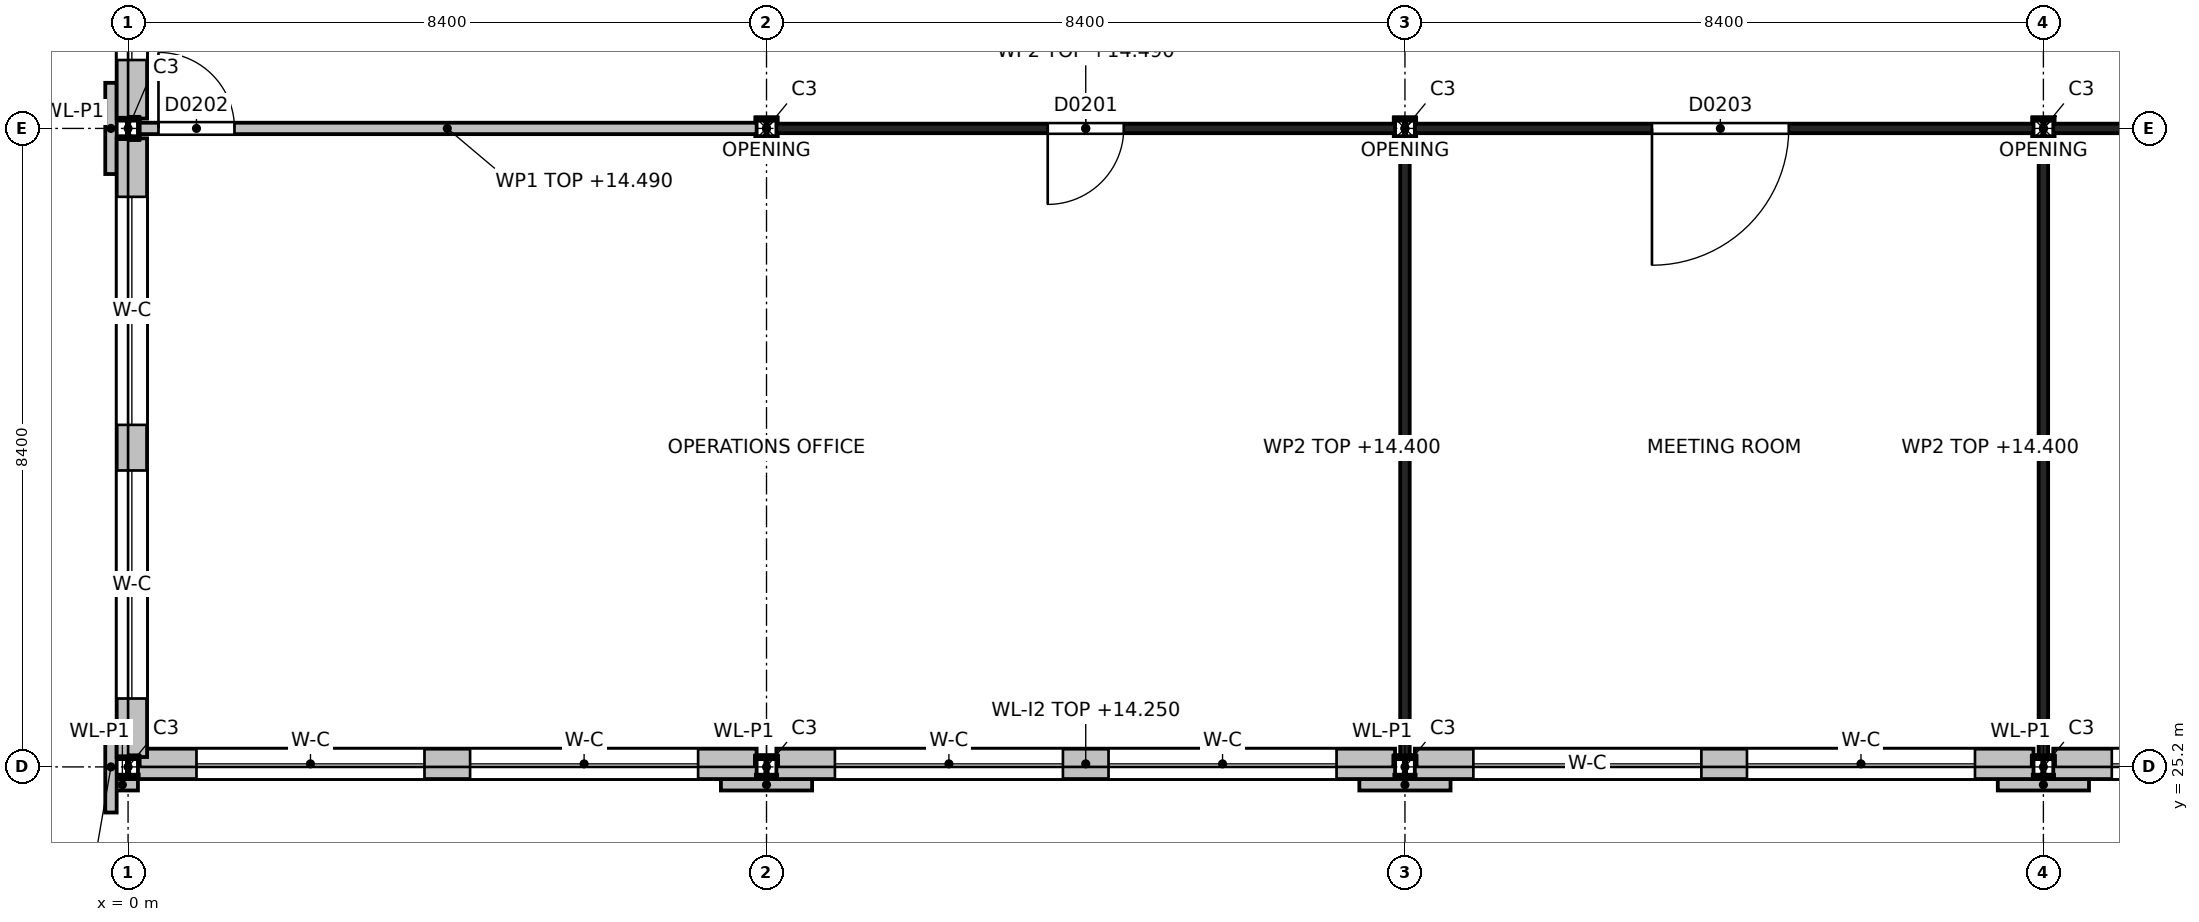
"""IFC4 building model, lengths in metres.
Left out: names, types, materials, properties, quantities, classifications, styles, units other than length and angle.
Written with IfcOpenShell. Run it as: python <this file> out.ifc"""

import sys

from ifc_helpers import new_model, si_unit, direction, frame, frame_2d, origin, origin_2d, place, context, subcontext, project, spatial, rectangle, i_section, extrude, element, fill, save


model = new_model("IFC4")
c1 = context("Model", 3, precision=1e-05, world=origin(), true_north=direction((0.0, 1.0)))
c2 = subcontext(c1, "Body", "Model", "MODEL_VIEW")
j1 = project(units=[si_unit("LENGTHUNIT", "METRE"), si_unit("PLANEANGLEUNIT", "RADIAN")], contexts=[c1])
p1 = place(None, origin())
s1 = spatial("IfcSite", under=j1, at=p1, CompositionType="ELEMENT")
p2 = place(p1, origin())
s2 = spatial("IfcBuilding", under=s1, at=p2, CompositionType="ELEMENT")
p3 = place(p2, frame((0.0, 0.0, 10.8)))
s3 = spatial("IfcBuildingStorey", under=s2, at=p3, CompositionType="ELEMENT", Elevation=10.8)
for number, where, z_axis, x_axis in (
    (1, (0.0, 25.2, 0.0), (0.0, 0.0, 1.0), (1.0, 0.0, 0.0)),
    (2, (0.0, 33.6, 0.0), (0.0, 0.0, 1.0), (1.0, 0.0, 0.0)),
    (3, (8.4, 25.2, 0.0), (0.0, 0.0, 1.0), (1.0, 0.0, 0.0)),
    (4, (8.4, 33.6, 0.0), (0.0, 0.0, 1.0), (1.0, 0.0, 0.0)),
    (5, (16.8, 25.2, 0.0), (0.0, 0.0, 1.0), (1.0, 0.0, 0.0)),
    (6, (16.8, 33.6, 0.0), (0.0, 0.0, 1.0), (1.0, 0.0, 0.0)),
    (7, (25.2, 25.2, 0.0), (0.0, 0.0, 1.0), (1.0, 0.0, 0.0)),
    (8, (25.2, 33.6, 0.0), (0.0, 0.0, 1.0), (1.0, 0.0, 0.0)),
):
    element("IfcColumn", number, at=place(p3, frame(where, z_axis=z_axis, x_axis=x_axis)), inside=s3, PredefinedType="COLUMN", context=c2, shape_type="SweptSolid", body=[
        extrude(i_section(OverallWidth=0.26, OverallDepth=0.26, WebThickness=0.01, FlangeThickness=0.018, at=origin_2d()), origin(), (0.0, 0.0, 1.0), 4.2),
    ])
p4 = place(p3, frame((0.13, 25.24, 0.0), z_axis=(0.0, 0.0, 1.0), x_axis=(1.0, 0.0, 0.0)))
e9 = element("IfcWall", 9, at=p4, inside=s3, PredefinedType="SOLIDWALL", context=c2, shape_type="SweptSolid", body=[
    extrude(rectangle(XDim=8.14, YDim=0.4, at=frame_2d((4.07, 0.0))), origin(), (0.0, 0.0, 1.0), 3.45),
])
p5 = place(p4, frame((0.77, 0.0, 0.9)))
e10 = element("IfcOpeningElement", 10, at=p5, cuts=e9, PredefinedType="OPENING", context=c2, shape_type="SweptSolid", body=[
    extrude(rectangle(XDim=3.0, YDim=2.4, at=frame_2d((1.5, 1.2))), frame((0.0, 0.2, 0.0), z_axis=(0.0, -1.0, 0.0), x_axis=(1.0, 0.0, 0.0)), (0.0, 0.0, 1.0), 0.4),
])
p6 = place(p4, frame((4.37, 0.0, 0.9)))
e11 = element("IfcOpeningElement", 11, at=p6, cuts=e9, PredefinedType="OPENING", context=c2, shape_type="SweptSolid", body=[
    extrude(rectangle(XDim=3.0, YDim=2.4, at=frame_2d((1.5, 1.2))), frame((0.0, 0.2, 0.0), z_axis=(0.0, -1.0, 0.0), x_axis=(1.0, 0.0, 0.0)), (0.0, 0.0, 1.0), 0.4),
])
p7 = place(p3, frame((8.53, 25.24, 0.0), z_axis=(0.0, 0.0, 1.0), x_axis=(1.0, 0.0, 0.0)))
e12 = element("IfcWall", 12, at=p7, inside=s3, PredefinedType="SOLIDWALL", context=c2, shape_type="SweptSolid", body=[
    extrude(rectangle(XDim=8.14, YDim=0.4, at=frame_2d((4.07, 0.0))), origin(), (0.0, 0.0, 1.0), 3.45),
])
p8 = place(p7, frame((0.77, 0.0, 0.9)))
e13 = element("IfcOpeningElement", 13, at=p8, cuts=e12, PredefinedType="OPENING", context=c2, shape_type="SweptSolid", body=[
    extrude(rectangle(XDim=3.0, YDim=2.4, at=frame_2d((1.5, 1.2))), frame((0.0, 0.2, 0.0), z_axis=(0.0, -1.0, 0.0), x_axis=(1.0, 0.0, 0.0)), (0.0, 0.0, 1.0), 0.4),
])
p9 = place(p7, frame((4.37, 0.0, 0.9)))
e14 = element("IfcOpeningElement", 14, at=p9, cuts=e12, PredefinedType="OPENING", context=c2, shape_type="SweptSolid", body=[
    extrude(rectangle(XDim=3.0, YDim=2.4, at=frame_2d((1.5, 1.2))), frame((0.0, 0.2, 0.0), z_axis=(0.0, -1.0, 0.0), x_axis=(1.0, 0.0, 0.0)), (0.0, 0.0, 1.0), 0.4),
])
p10 = place(p3, frame((16.93, 25.24, 0.0), z_axis=(0.0, 0.0, 1.0), x_axis=(1.0, 0.0, 0.0)))
e15 = element("IfcWall", 15, at=p10, inside=s3, PredefinedType="SOLIDWALL", context=c2, shape_type="SweptSolid", body=[
    extrude(rectangle(XDim=8.14, YDim=0.4, at=frame_2d((4.07, 0.0))), origin(), (0.0, 0.0, 1.0), 3.45),
])
p11 = place(p10, frame((0.77, 0.0, 0.9)))
e16 = element("IfcOpeningElement", 16, at=p11, cuts=e15, PredefinedType="OPENING", context=c2, shape_type="SweptSolid", body=[
    extrude(rectangle(XDim=3.0, YDim=2.4, at=frame_2d((1.5, 1.2))), frame((0.0, 0.2, 0.0), z_axis=(0.0, -1.0, 0.0), x_axis=(1.0, 0.0, 0.0)), (0.0, 0.0, 1.0), 0.4),
])
p12 = place(p10, frame((4.37, 0.0, 0.9)))
e17 = element("IfcOpeningElement", 17, at=p12, cuts=e15, PredefinedType="OPENING", context=c2, shape_type="SweptSolid", body=[
    extrude(rectangle(XDim=3.0, YDim=2.4, at=frame_2d((1.5, 1.2))), frame((0.0, 0.2, 0.0), z_axis=(0.0, -1.0, 0.0), x_axis=(1.0, 0.0, 0.0)), (0.0, 0.0, 1.0), 0.4),
])
p13 = place(p3, frame((25.33, 25.24, 0.0), z_axis=(0.0, 0.0, 1.0), x_axis=(1.0, 0.0, 0.0)))
e18 = element("IfcWall", 18, at=p13, inside=s3, PredefinedType="SOLIDWALL", context=c2, shape_type="SweptSolid", body=[
    extrude(rectangle(XDim=8.14, YDim=0.4, at=frame_2d((4.07, 0.0))), origin(), (0.0, 0.0, 1.0), 3.45),
])
p14 = place(p13, frame((0.77, 0.0, 0.9)))
e19 = element("IfcOpeningElement", 19, at=p14, cuts=e18, PredefinedType="OPENING", context=c2, shape_type="SweptSolid", body=[
    extrude(rectangle(XDim=3.0, YDim=2.4, at=frame_2d((1.5, 1.2))), frame((0.0, 0.2, 0.0), z_axis=(0.0, -1.0, 0.0), x_axis=(1.0, 0.0, 0.0)), (0.0, 0.0, 1.0), 0.4),
])
p15 = place(p13, frame((4.37, 0.0, 0.9)))
e20 = element("IfcOpeningElement", 20, at=p15, cuts=e18, PredefinedType="OPENING", context=c2, shape_type="SweptSolid", body=[
    extrude(rectangle(XDim=3.0, YDim=2.4, at=frame_2d((1.5, 1.2))), frame((0.0, 0.2, 0.0), z_axis=(0.0, -1.0, 0.0), x_axis=(1.0, 0.0, 0.0)), (0.0, 0.0, 1.0), 0.4),
])
p16 = place(p3, frame((-0.28, 24.965, 0.0), z_axis=(0.0, 0.0, 1.0), x_axis=(1.0, 0.0, 0.0)))
e21 = element("IfcWall", 21, at=p16, inside=s3, PredefinedType="SOLIDWALL", context=c2, shape_type="SweptSolid", body=[
    extrude(rectangle(XDim=0.41, YDim=0.15, at=frame_2d((0.205, 0.0))), origin(), (0.0, 0.0, 1.0), 4.2),
])
for number, where, z_axis, x_axis in (
    (22, (7.8, 24.965, 0.0), (0.0, 0.0, 1.0), (1.0, 0.0, 0.0)),
    (23, (16.2, 24.965, 0.0), (0.0, 0.0, 1.0), (1.0, 0.0, 0.0)),
    (24, (24.6, 24.965, 0.0), (0.0, 0.0, 1.0), (1.0, 0.0, 0.0)),
):
    element("IfcWall", number, at=place(p3, frame(where, z_axis=z_axis, x_axis=x_axis)), inside=s3, PredefinedType="SOLIDWALL", context=c2, shape_type="SweptSolid", body=[
        extrude(rectangle(XDim=1.2, YDim=0.15, at=frame_2d((0.6, 0.0))), origin(), (0.0, 0.0, 1.0), 4.2),
    ])
p17 = place(p3, frame((0.05, 25.33, 0.0), z_axis=(0.0, 0.0, 1.0), x_axis=(0.0, 1.0, 0.0)))
e25 = element("IfcWall", 25, at=p17, inside=s3, PredefinedType="SOLIDWALL", context=c2, shape_type="SweptSolid", body=[
    extrude(rectangle(XDim=8.14, YDim=0.4, at=frame_2d((4.07, 0.0))), origin(), (0.0, 0.0, 1.0), 3.45),
])
p18 = place(p17, frame((0.77, 0.0, 0.9)))
e26 = element("IfcOpeningElement", 26, at=p18, cuts=e25, PredefinedType="OPENING", context=c2, shape_type="SweptSolid", body=[
    extrude(rectangle(XDim=3.0, YDim=2.4, at=frame_2d((1.5, 1.2))), frame((0.0, 0.2, 0.0), z_axis=(0.0, -1.0, 0.0), x_axis=(1.0, 0.0, 0.0)), (0.0, 0.0, 1.0), 0.4),
])
p19 = place(p17, frame((4.37, 0.0, 0.9)))
e27 = element("IfcOpeningElement", 27, at=p19, cuts=e25, PredefinedType="OPENING", context=c2, shape_type="SweptSolid", body=[
    extrude(rectangle(XDim=3.0, YDim=2.4, at=frame_2d((1.5, 1.2))), frame((0.0, 0.2, 0.0), z_axis=(0.0, -1.0, 0.0), x_axis=(1.0, 0.0, 0.0)), (0.0, 0.0, 1.0), 0.4),
])
p20 = place(p3, frame((0.05, 33.73, 0.0), z_axis=(0.0, 0.0, 1.0), x_axis=(0.0, 1.0, 0.0)))
e28 = element("IfcWall", 28, at=p20, inside=s3, PredefinedType="SOLIDWALL", context=c2, shape_type="SweptSolid", body=[
    extrude(rectangle(XDim=8.47, YDim=0.4, at=frame_2d((4.235, 0.0))), origin(), (0.0, 0.0, 1.0), 3.45),
])
p21 = place(p20, frame((0.77, 0.0, 0.9)))
e29 = element("IfcOpeningElement", 29, at=p21, cuts=e28, PredefinedType="OPENING", context=c2, shape_type="SweptSolid", body=[
    extrude(rectangle(XDim=3.0, YDim=2.4, at=frame_2d((1.5, 1.2))), frame((0.0, 0.2, 0.0), z_axis=(0.0, -1.0, 0.0), x_axis=(1.0, 0.0, 0.0)), (0.0, 0.0, 1.0), 0.4),
])
p22 = place(p20, frame((4.37, 0.0, 0.9)))
e30 = element("IfcOpeningElement", 30, at=p22, cuts=e28, PredefinedType="OPENING", context=c2, shape_type="SweptSolid", body=[
    extrude(rectangle(XDim=3.0, YDim=2.4, at=frame_2d((1.5, 1.2))), frame((0.0, 0.2, 0.0), z_axis=(0.0, -1.0, 0.0), x_axis=(1.0, 0.0, 0.0)), (0.0, 0.0, 1.0), 0.4),
])
for number, where, z_axis, x_axis in (
    (31, (-0.225, 24.6, 0.0), (0.0, 0.0, 1.0), (0.0, 1.0, 0.0)),
    (32, (-0.225, 33.0, 0.0), (0.0, 0.0, 1.0), (0.0, 1.0, 0.0)),
):
    element("IfcWall", number, at=place(p3, frame(where, z_axis=z_axis, x_axis=x_axis)), inside=s3, PredefinedType="SOLIDWALL", context=c2, shape_type="SweptSolid", body=[
        extrude(rectangle(XDim=1.2, YDim=0.15, at=frame_2d((0.6, 0.0))), origin(), (0.0, 0.0, 1.0), 4.2),
    ])
p23 = place(p3, frame((16.8, 25.33, 0.0), z_axis=(0.0, 0.0, 1.0), x_axis=(0.0, 1.0, 0.0)))
e33 = element("IfcWall", 33, at=p23, inside=s3, PredefinedType="PARTITIONING", context=c2, shape_type="SweptSolid", body=[
    extrude(rectangle(XDim=8.14, YDim=0.125, at=frame_2d((4.07, 0.0))), origin(), (0.0, 0.0, 1.0), 3.6),
])
p24 = place(p3, frame((0.13, 33.6, 0.0), z_axis=(0.0, 0.0, 1.0), x_axis=(1.0, 0.0, 0.0)))
e34 = element("IfcWall", 34, at=p24, inside=s3, PredefinedType="PARTITIONING", context=c2, shape_type="SweptSolid", body=[
    extrude(rectangle(XDim=8.14, YDim=0.15, at=frame_2d((4.07, 0.0))), origin(), (0.0, 0.0, 1.0), 3.69),
])
p25 = place(p24, frame((0.27, 0.0, 0.0)))
e35 = element("IfcOpeningElement", 35, at=p25, cuts=e34, PredefinedType="OPENING", context=c2, shape_type="SweptSolid", body=[
    extrude(rectangle(XDim=1.0, YDim=2.2, at=frame_2d((0.5, 1.1))), frame((0.0, 0.075, 0.0), z_axis=(0.0, -1.0, 0.0), x_axis=(1.0, 0.0, 0.0)), (0.0, 0.0, 1.0), 0.15),
])
p26 = place(p3, frame((8.53, 33.6, 0.0), z_axis=(0.0, 0.0, 1.0), x_axis=(1.0, 0.0, 0.0)))
e36 = element("IfcWall", 36, at=p26, inside=s3, PredefinedType="PARTITIONING", context=c2, shape_type="SweptSolid", body=[
    extrude(rectangle(XDim=8.14, YDim=0.125, at=frame_2d((4.07, 0.0))), origin(), (0.0, 0.0, 1.0), 3.69),
])
p27 = place(p26, frame((3.57, 0.0, 0.0)))
e37 = element("IfcOpeningElement", 37, at=p27, cuts=e36, PredefinedType="OPENING", context=c2, shape_type="SweptSolid", body=[
    extrude(rectangle(XDim=1.0, YDim=2.2, at=frame_2d((0.5, 1.1))), frame((0.0, 0.062, 0.0), z_axis=(0.0, -1.0, 0.0), x_axis=(1.0, 0.0, 0.0)), (0.0, 0.0, 1.0), 0.125),
])
p28 = place(p3, frame((25.2, 25.33, 0.0), z_axis=(0.0, 0.0, 1.0), x_axis=(0.0, 1.0, 0.0)))
e38 = element("IfcWall", 38, at=p28, inside=s3, PredefinedType="PARTITIONING", context=c2, shape_type="SweptSolid", body=[
    extrude(rectangle(XDim=8.14, YDim=0.125, at=frame_2d((4.07, 0.0))), origin(), (0.0, 0.0, 1.0), 3.6),
])
p29 = place(p3, frame((16.93, 33.6, 0.0), z_axis=(0.0, 0.0, 1.0), x_axis=(1.0, 0.0, 0.0)))
e39 = element("IfcWall", 39, at=p29, inside=s3, PredefinedType="PARTITIONING", context=c2, shape_type="SweptSolid", body=[
    extrude(rectangle(XDim=8.14, YDim=0.125, at=frame_2d((4.07, 0.0))), origin(), (0.0, 0.0, 1.0), 3.69),
])
p30 = place(p29, frame((3.12, 0.0, 0.0)))
e40 = element("IfcOpeningElement", 40, at=p30, cuts=e39, PredefinedType="OPENING", context=c2, shape_type="SweptSolid", body=[
    extrude(rectangle(XDim=1.8, YDim=2.1, at=frame_2d((0.9, 1.05))), frame((0.0, 0.062, 0.0), z_axis=(0.0, -1.0, 0.0), x_axis=(1.0, 0.0, 0.0)), (0.0, 0.0, 1.0), 0.125),
])
p31 = place(p3, frame((25.33, 33.6, 0.0), z_axis=(0.0, 0.0, 1.0), x_axis=(1.0, 0.0, 0.0)))
e41 = element("IfcWall", 41, at=p31, inside=s3, PredefinedType="PARTITIONING", context=c2, shape_type="SweptSolid", body=[
    extrude(rectangle(XDim=8.14, YDim=0.125, at=frame_2d((4.07, 0.0))), origin(), (0.0, 0.0, 1.0), 3.65),
])
p32 = place(p31, frame((3.12, 0.0, 0.0)))
e42 = element("IfcOpeningElement", 42, at=p32, cuts=e41, PredefinedType="OPENING", context=c2, shape_type="SweptSolid", body=[
    extrude(rectangle(XDim=1.8, YDim=2.1, at=frame_2d((0.9, 1.05))), frame((0.0, 0.062, 0.0), z_axis=(0.0, -1.0, 0.0), x_axis=(1.0, 0.0, 0.0)), (0.0, 0.0, 1.0), 0.125),
])
p33 = place(p5, origin())
e43 = element("IfcWindow", 43, at=p33, inside=s3, PartitioningType="SINGLE_PANEL", PredefinedType="WINDOW", context=c2, shape_type="SweptSolid", body=[
    extrude(rectangle(XDim=3.0, YDim=2.4, at=frame_2d((1.5, 1.2))), frame((0.0, 0.03, 0.0), z_axis=(0.0, -1.0, 0.0), x_axis=(1.0, 0.0, 0.0)), (0.0, 0.0, 1.0), 0.06),
])
fill(e10, e43)
p34 = place(p6, origin())
e44 = element("IfcWindow", 44, at=p34, inside=s3, PartitioningType="SINGLE_PANEL", PredefinedType="WINDOW", context=c2, shape_type="SweptSolid", body=[
    extrude(rectangle(XDim=3.0, YDim=2.4, at=frame_2d((1.5, 1.2))), frame((0.0, 0.03, 0.0), z_axis=(0.0, -1.0, 0.0), x_axis=(1.0, 0.0, 0.0)), (0.0, 0.0, 1.0), 0.06),
])
fill(e11, e44)
p35 = place(p8, origin())
e45 = element("IfcWindow", 45, at=p35, inside=s3, PartitioningType="SINGLE_PANEL", PredefinedType="WINDOW", context=c2, shape_type="SweptSolid", body=[
    extrude(rectangle(XDim=3.0, YDim=2.4, at=frame_2d((1.5, 1.2))), frame((0.0, 0.03, 0.0), z_axis=(0.0, -1.0, 0.0), x_axis=(1.0, 0.0, 0.0)), (0.0, 0.0, 1.0), 0.06),
])
fill(e13, e45)
p36 = place(p9, origin())
e46 = element("IfcWindow", 46, at=p36, inside=s3, PartitioningType="SINGLE_PANEL", PredefinedType="WINDOW", context=c2, shape_type="SweptSolid", body=[
    extrude(rectangle(XDim=3.0, YDim=2.4, at=frame_2d((1.5, 1.2))), frame((0.0, 0.03, 0.0), z_axis=(0.0, -1.0, 0.0), x_axis=(1.0, 0.0, 0.0)), (0.0, 0.0, 1.0), 0.06),
])
fill(e14, e46)
p37 = place(p11, origin())
e47 = element("IfcWindow", 47, at=p37, inside=s3, PartitioningType="SINGLE_PANEL", PredefinedType="WINDOW", context=c2, shape_type="SweptSolid", body=[
    extrude(rectangle(XDim=3.0, YDim=2.4, at=frame_2d((1.5, 1.2))), frame((0.0, 0.03, 0.0), z_axis=(0.0, -1.0, 0.0), x_axis=(1.0, 0.0, 0.0)), (0.0, 0.0, 1.0), 0.06),
])
fill(e16, e47)
p38 = place(p12, origin())
e48 = element("IfcWindow", 48, at=p38, inside=s3, PartitioningType="SINGLE_PANEL", PredefinedType="WINDOW", context=c2, shape_type="SweptSolid", body=[
    extrude(rectangle(XDim=3.0, YDim=2.4, at=frame_2d((1.5, 1.2))), frame((0.0, 0.03, 0.0), z_axis=(0.0, -1.0, 0.0), x_axis=(1.0, 0.0, 0.0)), (0.0, 0.0, 1.0), 0.06),
])
fill(e17, e48)
p39 = place(p14, origin())
e49 = element("IfcWindow", 49, at=p39, inside=s3, PartitioningType="SINGLE_PANEL", PredefinedType="WINDOW", context=c2, shape_type="SweptSolid", body=[
    extrude(rectangle(XDim=3.0, YDim=2.4, at=frame_2d((1.5, 1.2))), frame((0.0, 0.03, 0.0), z_axis=(0.0, -1.0, 0.0), x_axis=(1.0, 0.0, 0.0)), (0.0, 0.0, 1.0), 0.06),
])
fill(e19, e49)
p40 = place(p18, origin())
e50 = element("IfcWindow", 50, at=p40, inside=s3, PartitioningType="SINGLE_PANEL", PredefinedType="WINDOW", context=c2, shape_type="SweptSolid", body=[
    extrude(rectangle(XDim=3.0, YDim=2.4, at=frame_2d((1.5, 1.2))), frame((0.0, 0.03, 0.0), z_axis=(0.0, -1.0, 0.0), x_axis=(1.0, 0.0, 0.0)), (0.0, 0.0, 1.0), 0.06),
])
fill(e26, e50)
p41 = place(p19, origin())
e51 = element("IfcWindow", 51, at=p41, inside=s3, PartitioningType="SINGLE_PANEL", PredefinedType="WINDOW", context=c2, shape_type="SweptSolid", body=[
    extrude(rectangle(XDim=3.0, YDim=2.4, at=frame_2d((1.5, 1.2))), frame((0.0, 0.03, 0.0), z_axis=(0.0, -1.0, 0.0), x_axis=(1.0, 0.0, 0.0)), (0.0, 0.0, 1.0), 0.06),
])
fill(e27, e51)
p42 = place(p21, origin())
e52 = element("IfcWindow", 52, at=p42, inside=s3, PartitioningType="SINGLE_PANEL", PredefinedType="WINDOW", context=c2, shape_type="SweptSolid", body=[
    extrude(rectangle(XDim=3.0, YDim=2.4, at=frame_2d((1.5, 1.2))), frame((0.0, 0.03, 0.0), z_axis=(0.0, -1.0, 0.0), x_axis=(1.0, 0.0, 0.0)), (0.0, 0.0, 1.0), 0.06),
])
fill(e29, e52)
p43 = place(p27, origin())
e53 = element("IfcDoor", 53, at=p43, inside=s3, OperationType="SINGLE_SWING_LEFT", PredefinedType="DOOR", context=c2, shape_type="SweptSolid", body=[
    extrude(rectangle(XDim=1.0, YDim=2.2, at=frame_2d((0.5, 1.1))), frame((0.0, 0.025, 0.0), z_axis=(0.0, -1.0, 0.0), x_axis=(1.0, 0.0, 0.0)), (0.0, 0.0, 1.0), 0.05),
])
fill(e37, e53)
p44 = place(p25, origin())
e54 = element("IfcDoor", 54, at=p44, inside=s3, OperationType="SINGLE_SWING_LEFT", PredefinedType="DOOR", context=c2, shape_type="SweptSolid", body=[
    extrude(rectangle(XDim=1.0, YDim=2.2, at=frame_2d((0.5, 1.1))), frame((0.0, 0.025, 0.0), z_axis=(0.0, -1.0, 0.0), x_axis=(1.0, 0.0, 0.0)), (0.0, 0.0, 1.0), 0.05),
])
fill(e35, e54)
p45 = place(p30, origin())
e55 = element("IfcDoor", 55, at=p45, inside=s3, OperationType="DOUBLE_DOOR_DOUBLE_SWING", PredefinedType="DOOR", context=c2, shape_type="SweptSolid", body=[
    extrude(rectangle(XDim=1.8, YDim=2.1, at=frame_2d((0.9, 1.05))), frame((0.0, 0.025, 0.0), z_axis=(0.0, -1.0, 0.0), x_axis=(1.0, 0.0, 0.0)), (0.0, 0.0, 1.0), 0.05),
])
fill(e40, e55)
save(model, sys.argv[1])
